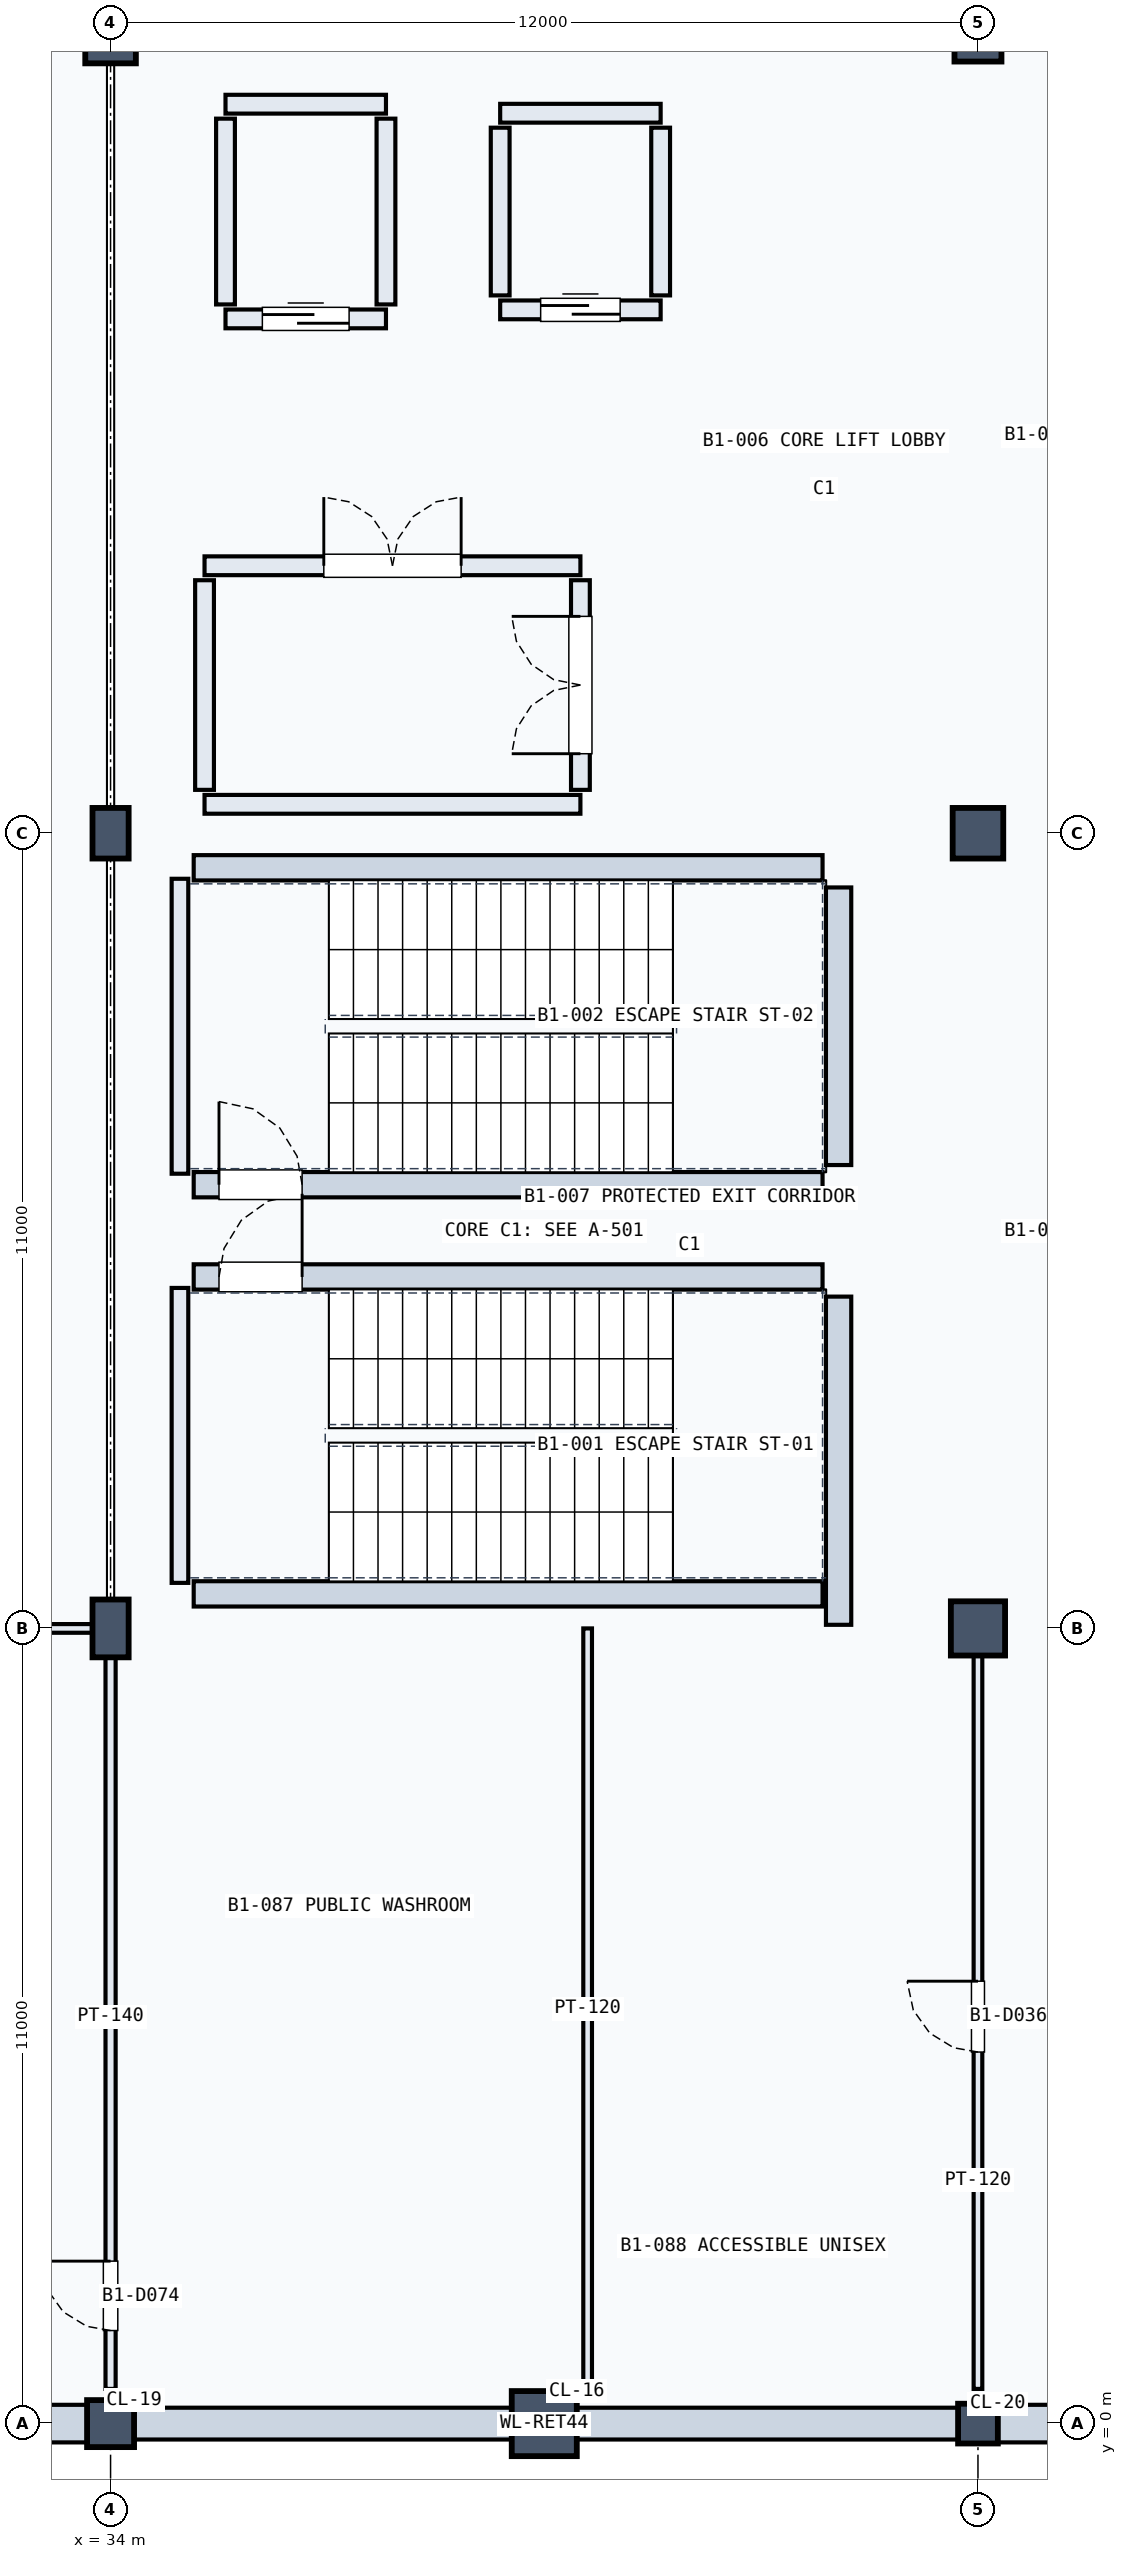
"""IFC4 building model, lengths in metres.
Left out: names, types, materials, properties, quantities, classifications, styles, units other than length and angle.
Written with IfcOpenShell. Run it as: python <this file> out.ifc"""

import sys

from ifc_helpers import new_model, si_unit, direction, frame, frame_2d, origin, origin_2d, place, context, subcontext, project, spatial, rectangle, circle, extrude, element, fill, save


model = new_model("IFC4")
c1 = context("Model", 3, precision=1e-05, world=origin(), true_north=direction((0.0, 1.0)))
c2 = subcontext(c1, "Body", "Model", "MODEL_VIEW")
j1 = project(units=[si_unit("LENGTHUNIT", "METRE"), si_unit("PLANEANGLEUNIT", "RADIAN")], contexts=[c1])
p1 = place(None, origin())
s1 = spatial("IfcSite", under=j1, at=p1, CompositionType="ELEMENT")
p2 = place(p1, origin())
s2 = spatial("IfcBuilding", under=s1, at=p2, CompositionType="ELEMENT")
p3 = place(p2, frame((0.0, 0.0, -5.4)))
s3 = spatial("IfcBuildingStorey", under=s2, at=p3, CompositionType="ELEMENT", Elevation=-5.4)
p4 = place(p3, frame((34.0, 0.0, 0.0), z_axis=(0.0, 0.0, 1.0), x_axis=(1.0, 0.0, 0.0)))
e1 = element("IfcColumn", 1, at=p4, inside=s3, PredefinedType="COLUMN", context=c2, shape_type="SweptSolid", body=[
    extrude(circle(Radius=0.325, at=origin_2d()), origin(), (0.0, 0.0, 1.0), 5.4),
])
p5 = place(p3, frame((34.0, 11.0, 0.0), z_axis=(0.0, 0.0, 1.0), x_axis=(1.0, 0.0, 0.0)))
e2 = element("IfcColumn", 2, at=p5, inside=s3, PredefinedType="COLUMN", context=c2, shape_type="SweptSolid", body=[
    extrude(rectangle(XDim=0.5, YDim=0.8, at=origin_2d()), origin(), (0.0, 0.0, 1.0), 5.4),
])
p6 = place(p3, frame((34.0, 22.0, 0.0), z_axis=(0.0, 0.0, 1.0), x_axis=(1.0, 0.0, 0.0)))
e3 = element("IfcColumn", 3, at=p6, inside=s3, PredefinedType="COLUMN", context=c2, shape_type="SweptSolid", body=[
    extrude(rectangle(XDim=0.5, YDim=0.7, at=origin_2d()), origin(), (0.0, 0.0, 1.0), 5.4),
])
p7 = place(p3, frame((34.0, 33.0, 0.0), z_axis=(0.0, 0.0, 1.0), x_axis=(1.0, 0.0, 0.0)))
e4 = element("IfcColumn", 4, at=p7, inside=s3, PredefinedType="COLUMN", context=c2, shape_type="SweptSolid", body=[
    extrude(rectangle(XDim=0.7, YDim=0.7, at=origin_2d()), origin(), (0.0, 0.0, 1.0), 5.4),
])
p8 = place(p3, frame((46.0, 0.0, 0.0), z_axis=(0.0, 0.0, 1.0), x_axis=(1.0, 0.0, 0.0)))
e5 = element("IfcColumn", 5, at=p8, inside=s3, PredefinedType="COLUMN", context=c2, shape_type="SweptSolid", body=[
    extrude(circle(Radius=0.275, at=origin_2d()), origin(), (0.0, 0.0, 1.0), 5.4),
])
p9 = place(p3, frame((46.0, 11.0, 0.0), z_axis=(0.0, 0.0, 1.0), x_axis=(1.0, 0.0, 0.0)))
e6 = element("IfcColumn", 6, at=p9, inside=s3, PredefinedType="COLUMN", context=c2, shape_type="SweptSolid", body=[
    extrude(rectangle(XDim=0.75, YDim=0.75, at=origin_2d()), origin(), (0.0, 0.0, 1.0), 5.4),
])
p10 = place(p3, frame((46.0, 22.0, 0.0), z_axis=(0.0, 0.0, 1.0), x_axis=(1.0, 0.0, 0.0)))
e7 = element("IfcColumn", 7, at=p10, inside=s3, PredefinedType="COLUMN", context=c2, shape_type="SweptSolid", body=[
    extrude(rectangle(XDim=0.7, YDim=0.7, at=origin_2d()), origin(), (0.0, 0.0, 1.0), 5.4),
])
p11 = place(p3, frame((46.0, 33.0, 0.0), z_axis=(0.0, 0.0, 1.0), x_axis=(1.0, 0.0, 0.0)))
e8 = element("IfcColumn", 8, at=p11, inside=s3, PredefinedType="COLUMN", context=c2, shape_type="SweptSolid", body=[
    extrude(rectangle(XDim=0.65, YDim=0.65, at=origin_2d()), origin(), (0.0, 0.0, 1.0), 5.4),
])
p12 = place(p3, frame((40.0, 0.0, 0.0), z_axis=(0.0, 0.0, 1.0), x_axis=(1.0, 0.0, 0.0)))
e9 = element("IfcColumn", 9, at=p12, inside=s3, PredefinedType="COLUMN", context=c2, shape_type="SweptSolid", body=[
    extrude(circle(Radius=0.45, at=origin_2d()), origin(), (0.0, 0.0, 1.0), 5.4),
])
p13 = place(p3, frame((22.22, 0.0, 0.0), z_axis=(0.0, 0.0, 1.0), x_axis=(1.0, 0.0, 0.0)))
e10 = element("IfcWall", 10, at=p13, inside=s3, PredefinedType="SOLIDWALL", context=c2, shape_type="SweptSolid", body=[
    extrude(rectangle(XDim=11.56, YDim=0.52, at=frame_2d((5.78, 0.0))), origin(), (0.0, 0.0, 1.0), 4.346),
])
p14 = place(p3, frame((34.22, 0.0, 0.0), z_axis=(0.0, 0.0, 1.0), x_axis=(1.0, 0.0, 0.0)))
e11 = element("IfcWall", 11, at=p14, inside=s3, PredefinedType="SOLIDWALL", context=c2, shape_type="SweptSolid", body=[
    extrude(rectangle(XDim=11.56, YDim=0.44, at=frame_2d((5.78, 0.0))), origin(), (0.0, 0.0, 1.0), 4.13),
])
p15 = place(p3, frame((46.22, 0.0, 0.0), z_axis=(0.0, 0.0, 1.0), x_axis=(1.0, 0.0, 0.0)))
e12 = element("IfcWall", 12, at=p15, inside=s3, PredefinedType="SOLIDWALL", context=c2, shape_type="SweptSolid", body=[
    extrude(rectangle(XDim=11.56, YDim=0.52, at=frame_2d((5.78, 0.0))), origin(), (0.0, 0.0, 1.0), 4.13),
])
p16 = place(p3, frame((34.96, 11.63, 0.0), z_axis=(0.0, 0.0, 1.0), x_axis=(0.0, 1.0, 0.0)))
e13 = element("IfcWall", 13, at=p16, inside=s3, PredefinedType="SOLIDWALL", context=c2, shape_type="SweptSolid", body=[
    extrude(rectangle(XDim=4.08, YDim=0.23, at=frame_2d((2.04, 0.0))), origin(), (0.0, 0.0, 1.0), 4.43),
])
p17 = place(p3, frame((44.072, 11.05, 0.0), z_axis=(0.0, 0.0, 1.0), x_axis=(0.0, 1.0, 0.0)))
e14 = element("IfcWall", 14, at=p17, inside=s3, PredefinedType="SOLIDWALL", context=c2, shape_type="SweptSolid", body=[
    extrude(rectangle(XDim=4.54, YDim=0.35, at=frame_2d((2.27, 0.0))), origin(), (0.0, 0.0, 1.0), 5.04),
])
p18 = place(p3, frame((35.15, 11.478, 0.0), z_axis=(0.0, 0.0, 1.0), x_axis=(1.0, 0.0, 0.0)))
e15 = element("IfcWall", 15, at=p18, inside=s3, PredefinedType="SOLIDWALL", context=c2, shape_type="SweptSolid", body=[
    extrude(rectangle(XDim=8.7, YDim=0.35, at=frame_2d((4.35, 0.0))), origin(), (0.0, 0.0, 1.0), 5.04),
])
p19 = place(p3, frame((35.15, 15.862, 0.0), z_axis=(0.0, 0.0, 1.0), x_axis=(1.0, 0.0, 0.0)))
e16 = element("IfcWall", 16, at=p19, inside=s3, PredefinedType="SOLIDWALL", context=c2, shape_type="SweptSolid", body=[
    extrude(rectangle(XDim=8.7, YDim=0.35, at=frame_2d((4.35, 0.0))), origin(), (0.0, 0.0, 1.0), 5.04),
])
p20 = place(p19, frame((0.35, 0.0, 0.0)))
e17 = element("IfcOpeningElement", 17, at=p20, cuts=e16, PredefinedType="OPENING", context=c2, shape_type="SweptSolid", body=[
    extrude(rectangle(XDim=1.15, YDim=2.2, at=frame_2d((0.575, 1.1))), frame((0.0, 0.185, 0.0), z_axis=(0.0, -1.0, 0.0), x_axis=(1.0, 0.0, 0.0)), (0.0, 0.0, 1.0), 0.37),
])
p21 = place(p3, frame((34.96, 17.29, 0.0), z_axis=(0.0, 0.0, 1.0), x_axis=(0.0, 1.0, 0.0)))
e18 = element("IfcWall", 18, at=p21, inside=s3, PredefinedType="SOLIDWALL", context=c2, shape_type="SweptSolid", body=[
    extrude(rectangle(XDim=4.08, YDim=0.23, at=frame_2d((2.04, 0.0))), origin(), (0.0, 0.0, 1.0), 4.43),
])
p22 = place(p3, frame((44.072, 17.41, 0.0), z_axis=(0.0, 0.0, 1.0), x_axis=(0.0, 1.0, 0.0)))
e19 = element("IfcWall", 19, at=p22, inside=s3, PredefinedType="SOLIDWALL", context=c2, shape_type="SweptSolid", body=[
    extrude(rectangle(XDim=3.84, YDim=0.35, at=frame_2d((1.92, 0.0))), origin(), (0.0, 0.0, 1.0), 5.04),
])
p23 = place(p3, frame((35.15, 17.138, 0.0), z_axis=(0.0, 0.0, 1.0), x_axis=(1.0, 0.0, 0.0)))
e20 = element("IfcWall", 20, at=p23, inside=s3, PredefinedType="SOLIDWALL", context=c2, shape_type="SweptSolid", body=[
    extrude(rectangle(XDim=8.7, YDim=0.35, at=frame_2d((4.35, 0.0))), origin(), (0.0, 0.0, 1.0), 5.04),
])
p24 = place(p23, frame((0.35, 0.0, 0.0)))
e21 = element("IfcOpeningElement", 21, at=p24, cuts=e20, PredefinedType="OPENING", context=c2, shape_type="SweptSolid", body=[
    extrude(rectangle(XDim=1.15, YDim=2.2, at=frame_2d((0.575, 1.1))), frame((0.0, 0.185, 0.0), z_axis=(0.0, -1.0, 0.0), x_axis=(1.0, 0.0, 0.0)), (0.0, 0.0, 1.0), 0.37),
])
p25 = place(p3, frame((35.15, 21.522, 0.0), z_axis=(0.0, 0.0, 1.0), x_axis=(1.0, 0.0, 0.0)))
e22 = element("IfcWall", 22, at=p25, inside=s3, PredefinedType="SOLIDWALL", context=c2, shape_type="SweptSolid", body=[
    extrude(rectangle(XDim=8.7, YDim=0.35, at=frame_2d((4.35, 0.0))), origin(), (0.0, 0.0, 1.0), 5.04),
])
p26 = place(p3, frame((35.59, 29.115, 0.0), z_axis=(0.0, 0.0, 1.0), x_axis=(1.0, 0.0, 0.0)))
e23 = element("IfcWall", 23, at=p26, inside=s3, PredefinedType="SOLIDWALL", context=c2, shape_type="SweptSolid", body=[
    extrude(rectangle(XDim=2.22, YDim=0.26, at=frame_2d((1.11, 0.0))), origin(), (0.0, 0.0, 1.0), 5.04),
])
p27 = place(p26, frame((0.51, 0.0, 0.0)))
e24 = element("IfcOpeningElement", 24, at=p27, cuts=e23, PredefinedType="OPENING", context=c2, shape_type="SweptSolid", body=[
    extrude(rectangle(XDim=1.2, YDim=2.2, at=frame_2d((0.6, 1.1))), frame((0.0, 0.14, 0.0), z_axis=(0.0, -1.0, 0.0), x_axis=(1.0, 0.0, 0.0)), (0.0, 0.0, 1.0), 0.28),
])
p28 = place(p3, frame((35.59, 32.085, 0.0), z_axis=(0.0, 0.0, 1.0), x_axis=(1.0, 0.0, 0.0)))
e25 = element("IfcWall", 25, at=p28, inside=s3, PredefinedType="SOLIDWALL", context=c2, shape_type="SweptSolid", body=[
    extrude(rectangle(XDim=2.22, YDim=0.26, at=frame_2d((1.11, 0.0))), origin(), (0.0, 0.0, 1.0), 5.04),
])
for number, where, z_axis, x_axis in (
    (26, (35.59, 29.315, 0.0), (0.0, 0.0, 1.0), (0.0, 1.0, 0.0)),
    (27, (37.81, 29.315, 0.0), (0.0, 0.0, 1.0), (0.0, 1.0, 0.0)),
):
    element("IfcWall", number, at=place(p3, frame(where, z_axis=z_axis, x_axis=x_axis)), inside=s3, PredefinedType="SOLIDWALL", context=c2, shape_type="SweptSolid", body=[
        extrude(rectangle(XDim=2.57, YDim=0.26, at=frame_2d((1.285, 0.0))), origin(), (0.0, 0.0, 1.0), 5.04),
    ])
p29 = place(p3, frame((39.39, 29.24, 0.0), z_axis=(0.0, 0.0, 1.0), x_axis=(1.0, 0.0, 0.0)))
e28 = element("IfcWall", 28, at=p29, inside=s3, PredefinedType="SOLIDWALL", context=c2, shape_type="SweptSolid", body=[
    extrude(rectangle(XDim=2.22, YDim=0.26, at=frame_2d((1.11, 0.0))), origin(), (0.0, 0.0, 1.0), 5.04),
])
p30 = place(p29, frame((0.56, 0.0, 0.0)))
e29 = element("IfcOpeningElement", 29, at=p30, cuts=e28, PredefinedType="OPENING", context=c2, shape_type="SweptSolid", body=[
    extrude(rectangle(XDim=1.1, YDim=2.15, at=frame_2d((0.55, 1.075))), frame((0.0, 0.14, 0.0), z_axis=(0.0, -1.0, 0.0), x_axis=(1.0, 0.0, 0.0)), (0.0, 0.0, 1.0), 0.28),
])
p31 = place(p3, frame((39.39, 31.96, 0.0), z_axis=(0.0, 0.0, 1.0), x_axis=(1.0, 0.0, 0.0)))
e30 = element("IfcWall", 30, at=p31, inside=s3, PredefinedType="SOLIDWALL", context=c2, shape_type="SweptSolid", body=[
    extrude(rectangle(XDim=2.22, YDim=0.26, at=frame_2d((1.11, 0.0))), origin(), (0.0, 0.0, 1.0), 5.04),
])
for number, where, z_axis, x_axis in (
    (31, (39.39, 29.44, 0.0), (0.0, 0.0, 1.0), (0.0, 1.0, 0.0)),
    (32, (41.61, 29.44, 0.0), (0.0, 0.0, 1.0), (0.0, 1.0, 0.0)),
):
    element("IfcWall", number, at=place(p3, frame(where, z_axis=z_axis, x_axis=x_axis)), inside=s3, PredefinedType="SOLIDWALL", context=c2, shape_type="SweptSolid", body=[
        extrude(rectangle(XDim=2.32, YDim=0.26, at=frame_2d((1.16, 0.0))), origin(), (0.0, 0.0, 1.0), 5.04),
    ])
p32 = place(p3, frame((35.3, 25.7, 0.0), z_axis=(0.0, 0.0, 1.0), x_axis=(1.0, 0.0, 0.0)))
e33 = element("IfcWall", 33, at=p32, inside=s3, PredefinedType="SOLIDWALL", context=c2, shape_type="SweptSolid", body=[
    extrude(rectangle(XDim=5.2, YDim=0.26, at=frame_2d((2.6, 0.0))), origin(), (0.0, 0.0, 1.0), 5.04),
])
p33 = place(p32, frame((1.65, 0.0, 0.0)))
e34 = element("IfcOpeningElement", 34, at=p33, cuts=e33, PredefinedType="OPENING", context=c2, shape_type="SweptSolid", body=[
    extrude(rectangle(XDim=1.9, YDim=2.2, at=frame_2d((0.95, 1.1))), frame((0.0, 0.14, 0.0), z_axis=(0.0, -1.0, 0.0), x_axis=(1.0, 0.0, 0.0)), (0.0, 0.0, 1.0), 0.28),
])
p34 = place(p3, frame((35.3, 22.4, 0.0), z_axis=(0.0, 0.0, 1.0), x_axis=(1.0, 0.0, 0.0)))
e35 = element("IfcWall", 35, at=p34, inside=s3, PredefinedType="SOLIDWALL", context=c2, shape_type="SweptSolid", body=[
    extrude(rectangle(XDim=5.2, YDim=0.26, at=frame_2d((2.6, 0.0))), origin(), (0.0, 0.0, 1.0), 4.41),
])
p35 = place(p3, frame((35.3, 22.6, 0.0), z_axis=(0.0, 0.0, 1.0), x_axis=(0.0, 1.0, 0.0)))
e36 = element("IfcWall", 36, at=p35, inside=s3, PredefinedType="SOLIDWALL", context=c2, shape_type="SweptSolid", body=[
    extrude(rectangle(XDim=2.9, YDim=0.26, at=frame_2d((1.45, 0.0))), origin(), (0.0, 0.0, 1.0), 5.04),
])
p36 = place(p3, frame((40.5, 22.6, 0.0), z_axis=(0.0, 0.0, 1.0), x_axis=(0.0, 1.0, 0.0)))
e37 = element("IfcWall", 37, at=p36, inside=s3, PredefinedType="SOLIDWALL", context=c2, shape_type="SweptSolid", body=[
    extrude(rectangle(XDim=2.9, YDim=0.26, at=frame_2d((1.45, 0.0))), origin(), (0.0, 0.0, 1.0), 5.04),
])
p37 = place(p36, frame((0.5, 0.0, 0.0)))
e38 = element("IfcOpeningElement", 38, at=p37, cuts=e37, PredefinedType="OPENING", context=c2, shape_type="SweptSolid", body=[
    extrude(rectangle(XDim=1.9, YDim=2.2, at=frame_2d((0.95, 1.1))), frame((0.0, 0.14, 0.0), z_axis=(0.0, -1.0, 0.0), x_axis=(1.0, 0.0, 0.0)), (0.0, 0.0, 1.0), 0.28),
])
p38 = place(p3, frame((22.16, 11.0, 0.0), z_axis=(0.0, 0.0, 1.0), x_axis=(1.0, 0.0, 0.0)))
e39 = element("IfcWall", 39, at=p38, inside=s3, PredefinedType="PARTITIONING", context=c2, shape_type="SweptSolid", body=[
    extrude(rectangle(XDim=11.62, YDim=0.12, at=frame_2d((5.81, 0.0))), origin(), (0.0, 0.0, 1.0), 4.28),
])
p39 = place(p3, frame((46.0, 0.48, 0.0), z_axis=(0.0, 0.0, 1.0), x_axis=(0.0, 1.0, 0.0)))
e40 = element("IfcWall", 40, at=p39, inside=s3, PredefinedType="PARTITIONING", context=c2, shape_type="SweptSolid", body=[
    extrude(rectangle(XDim=10.3, YDim=0.12, at=frame_2d((5.15, 0.0))), origin(), (0.0, 0.0, 1.0), 4.08),
])
p40 = place(p39, frame((4.66, 0.0, 0.0)))
e41 = element("IfcOpeningElement", 41, at=p40, cuts=e40, PredefinedType="OPENING", context=c2, shape_type="SweptSolid", body=[
    extrude(rectangle(XDim=0.98, YDim=2.1, at=frame_2d((0.49, 1.05))), frame((0.0, 0.07, 0.0), z_axis=(0.0, -1.0, 0.0), x_axis=(1.0, 0.0, 0.0)), (0.0, 0.0, 1.0), 0.14),
])
p41 = place(p3, frame((34.0, 0.48, 0.0), z_axis=(0.0, 0.0, 1.0), x_axis=(0.0, 1.0, 0.0)))
e42 = element("IfcWall", 42, at=p41, inside=s3, PredefinedType="PARTITIONING", context=c2, shape_type="SweptSolid", body=[
    extrude(rectangle(XDim=10.3, YDim=0.14, at=frame_2d((5.15, 0.0))), origin(), (0.0, 0.0, 1.0), 4.33),
])
p42 = place(p41, frame((0.808, 0.0, 0.0)))
e43 = element("IfcOpeningElement", 43, at=p42, cuts=e42, PredefinedType="OPENING", context=c2, shape_type="SweptSolid", body=[
    extrude(rectangle(XDim=0.96, YDim=2.15, at=frame_2d((0.48, 1.075))), frame((0.0, 0.08, 0.0), z_axis=(0.0, -1.0, 0.0), x_axis=(1.0, 0.0, 0.0)), (0.0, 0.0, 1.0), 0.16),
])
p43 = place(p3, frame((40.6, 0.48, 0.0), z_axis=(0.0, 0.0, 1.0), x_axis=(0.0, 1.0, 0.0)))
e44 = element("IfcWall", 44, at=p43, inside=s3, PredefinedType="PARTITIONING", context=c2, shape_type="SweptSolid", body=[
    extrude(rectangle(XDim=10.52, YDim=0.12, at=frame_2d((5.26, 0.0))), origin(), (0.0, 0.0, 1.0), 4.43),
])
p44 = place(p20, origin())
e45 = element("IfcDoor", 45, at=p44, inside=s3, OperationType="SINGLE_SWING_RIGHT", PredefinedType="DOOR", context=c2, shape_type="SweptSolid", body=[
    extrude(rectangle(XDim=1.15, YDim=2.2, at=frame_2d((0.575, 1.1))), frame((0.0, 0.025, 0.0), z_axis=(0.0, -1.0, 0.0), x_axis=(1.0, 0.0, 0.0)), (0.0, 0.0, 1.0), 0.05),
])
fill(e17, e45)
p45 = place(p24, origin())
e46 = element("IfcDoor", 46, at=p45, inside=s3, OperationType="SINGLE_SWING_LEFT", PredefinedType="DOOR", context=c2, shape_type="SweptSolid", body=[
    extrude(rectangle(XDim=1.15, YDim=2.2, at=frame_2d((0.575, 1.1))), frame((0.0, 0.025, 0.0), z_axis=(0.0, -1.0, 0.0), x_axis=(1.0, 0.0, 0.0)), (0.0, 0.0, 1.0), 0.05),
])
fill(e21, e46)
p46 = place(p27, origin())
e47 = element("IfcDoor", 47, at=p46, inside=s3, OperationType="SLIDING_TO_LEFT", PredefinedType="DOOR", context=c2, shape_type="SweptSolid", body=[
    extrude(rectangle(XDim=1.2, YDim=2.2, at=frame_2d((0.6, 1.1))), frame((0.0, 0.025, 0.0), z_axis=(0.0, -1.0, 0.0), x_axis=(1.0, 0.0, 0.0)), (0.0, 0.0, 1.0), 0.05),
])
fill(e24, e47)
p47 = place(p30, origin())
e48 = element("IfcDoor", 48, at=p47, inside=s3, OperationType="SLIDING_TO_LEFT", PredefinedType="DOOR", context=c2, shape_type="SweptSolid", body=[
    extrude(rectangle(XDim=1.1, YDim=2.15, at=frame_2d((0.55, 1.075))), frame((0.0, 0.025, 0.0), z_axis=(0.0, -1.0, 0.0), x_axis=(1.0, 0.0, 0.0)), (0.0, 0.0, 1.0), 0.05),
])
fill(e29, e48)
p48 = place(p33, origin())
e49 = element("IfcDoor", 49, at=p48, inside=s3, OperationType="DOUBLE_DOOR_SINGLE_SWING", PredefinedType="DOOR", context=c2, shape_type="SweptSolid", body=[
    extrude(rectangle(XDim=1.9, YDim=2.2, at=frame_2d((0.95, 1.1))), frame((0.0, 0.025, 0.0), z_axis=(0.0, -1.0, 0.0), x_axis=(1.0, 0.0, 0.0)), (0.0, 0.0, 1.0), 0.05),
])
fill(e34, e49)
p49 = place(p37, origin())
e50 = element("IfcDoor", 50, at=p49, inside=s3, OperationType="DOUBLE_DOOR_SINGLE_SWING", PredefinedType="DOOR", context=c2, shape_type="SweptSolid", body=[
    extrude(rectangle(XDim=1.9, YDim=2.2, at=frame_2d((0.95, 1.1))), frame((0.0, 0.025, 0.0), z_axis=(0.0, -1.0, 0.0), x_axis=(1.0, 0.0, 0.0)), (0.0, 0.0, 1.0), 0.05),
])
fill(e38, e50)
p50 = place(p40, origin())
e51 = element("IfcDoor", 51, at=p50, inside=s3, OperationType="SINGLE_SWING_RIGHT", PredefinedType="DOOR", context=c2, shape_type="SweptSolid", body=[
    extrude(rectangle(XDim=0.98, YDim=2.1, at=frame_2d((0.49, 1.05))), frame((0.0, 0.025, 0.0), z_axis=(0.0, -1.0, 0.0), x_axis=(1.0, 0.0, 0.0)), (0.0, 0.0, 1.0), 0.05),
])
fill(e41, e51)
p51 = place(p42, origin())
e52 = element("IfcDoor", 52, at=p51, inside=s3, OperationType="SINGLE_SWING_RIGHT", PredefinedType="DOOR", context=c2, shape_type="SweptSolid", body=[
    extrude(rectangle(XDim=0.96, YDim=2.15, at=frame_2d((0.48, 1.075))), frame((0.0, 0.025, 0.0), z_axis=(0.0, -1.0, 0.0), x_axis=(1.0, 0.0, 0.0)), (0.0, 0.0, 1.0), 0.05),
])
fill(e43, e52)
save(model, sys.argv[1])
